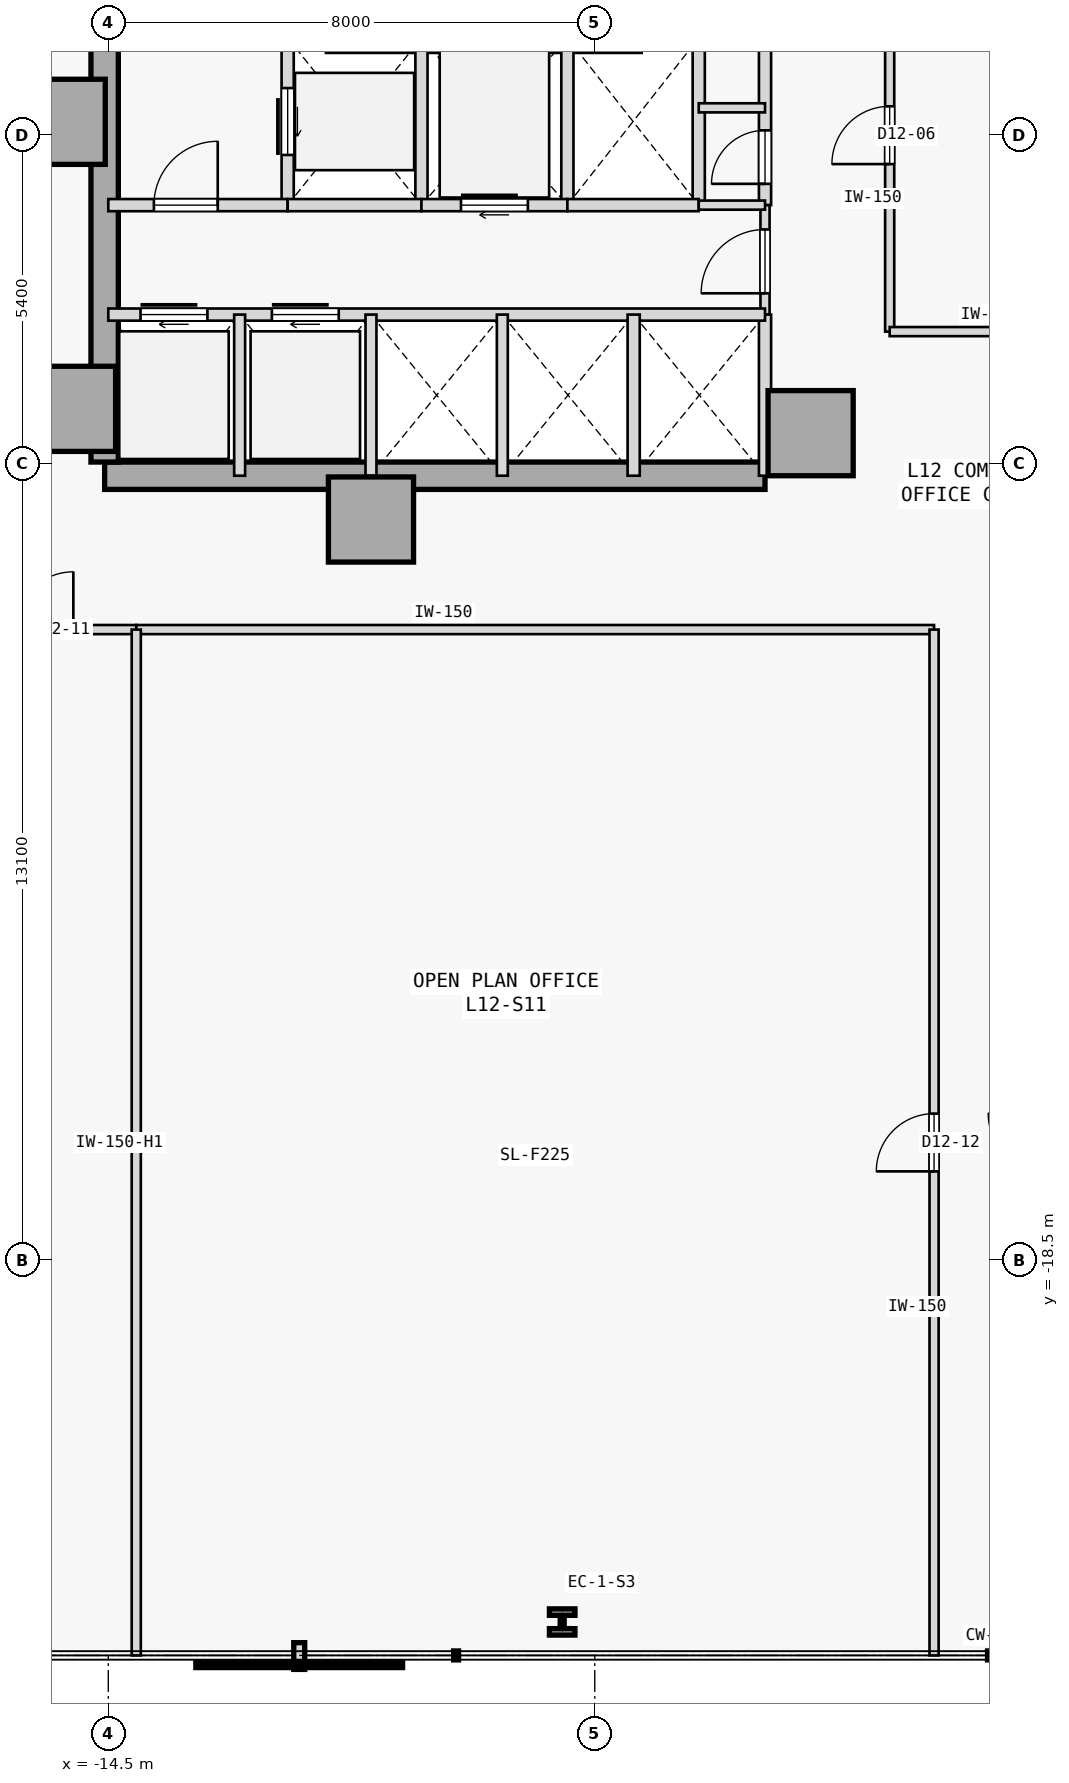
"""IFC4 building model, lengths in metres.
Left out: names, types, materials, properties, quantities, classifications, styles, units other than length and angle.
Written with IfcOpenShell. Run it as: python <this file> out.ifc"""

import sys

from ifc_helpers import new_model, si_unit, direction, frame, frame_2d, origin, origin_2d, place, context, subcontext, project, spatial, rectangle, i_section, extrude, element, fill, save


model = new_model("IFC4")
c1 = context("Model", 3, precision=1e-05, world=origin(), true_north=direction((0.0, 1.0)))
c2 = subcontext(c1, "Body", "Model", "MODEL_VIEW")
j1 = project(units=[si_unit("LENGTHUNIT", "METRE"), si_unit("PLANEANGLEUNIT", "RADIAN")], contexts=[c1])
p1 = place(None, origin())
s1 = spatial("IfcSite", under=j1, at=p1, CompositionType="ELEMENT")
p2 = place(p1, origin())
s2 = spatial("IfcBuilding", under=s1, at=p2, CompositionType="ELEMENT")
p3 = place(p2, frame((0.0, 0.0, 52.2)))
s3 = spatial("IfcBuildingStorey", under=s2, at=p3, CompositionType="ELEMENT", Elevation=52.2)
for number, where, z_axis, x_axis in (
    (1, (-15.25, 0.22, 0.0), (0.0, 0.0, 1.0), (1.0, 0.0, 0.0)),
    (2, (-15.08, -4.5, 0.0), (0.0, 0.0, 1.0), (1.0, 0.0, 0.0)),
    (3, (-10.18, -6.32, 0.0), (0.0, 0.0, 1.0), (1.0, 0.0, 0.0)),
    (4, (-2.95, -4.9, 0.0), (0.0, 0.0, 1.0), (1.0, 0.0, 0.0)),
):
    element("IfcColumn", number, at=place(p3, frame(where, z_axis=z_axis, x_axis=x_axis)), inside=s3, PredefinedType="COLUMN", context=c2, shape_type="SweptSolid", body=[
        extrude(rectangle(XDim=1.4, YDim=1.4, at=origin_2d()), origin(), (0.0, 0.0, 1.0), 3.8),
    ])
p4 = place(p3, frame((-14.56, -5.6, 0.0), z_axis=(0.0, 0.0, 1.0), x_axis=(1.0, 0.0, 0.0)))
e5 = element("IfcWall", 5, at=p4, inside=s3, PredefinedType="SHEAR", context=c2, shape_type="SweptSolid", body=[
    extrude(rectangle(XDim=10.86, YDim=0.45, at=frame_2d((5.43, 0.0))), origin(), (0.0, 0.0, 1.0), 3.575),
])
p5 = place(p3, frame((-14.56, -5.375, 0.0), z_axis=(0.0, 0.0, 1.0), x_axis=(0.0, 1.0, 0.0)))
e6 = element("IfcWall", 6, at=p5, inside=s3, PredefinedType="SHEAR", context=c2, shape_type="SweptSolid", body=[
    extrude(rectangle(XDim=10.75, YDim=0.45, at=frame_2d((5.375, 0.0))), origin(), (0.0, 0.0, 1.0), 3.575),
])
p6 = place(p3, frame((-7.036, -24.45, 0.0), z_axis=(0.0, 0.0, 1.0), x_axis=(1.0, 0.0, 0.0)))
e7 = element("IfcColumn", 7, at=p6, inside=s3, PredefinedType="COLUMN", context=c2, shape_type="SweptSolid", body=[
    extrude(i_section(OverallWidth=0.42, OverallDepth=0.431, WebThickness=0.065, FlangeThickness=0.106, FilletRadius=0.015, at=origin_2d()), origin(), (0.0, 0.0, 1.0), 3.8),
])
p7 = place(p3, frame((-3.7, -1.15, 0.0), z_axis=(0.0, 0.0, 1.0), x_axis=(0.0, 1.0, 0.0)))
e8 = element("IfcWall", 8, at=p7, inside=s3, PredefinedType="STANDARD", context=c2, shape_type="SweptSolid", body=[
    extrude(rectangle(XDim=6.75, YDim=0.2, at=frame_2d((3.375, 0.0))), origin(), (0.0, 0.0, 1.0), 3.575),
])
p8 = place(p7, frame((0.35, 0.0, 0.0)))
e9 = element("IfcOpeningElement", 9, at=p8, cuts=e8, PredefinedType="OPENING", context=c2, shape_type="SweptSolid", body=[
    extrude(rectangle(XDim=0.88, YDim=2.15, at=frame_2d((0.44, 1.075))), frame((0.0, 0.11, 0.0), z_axis=(0.0, -1.0, 0.0), x_axis=(1.0, 0.0, 0.0)), (0.0, 0.0, 1.0), 0.22),
])
p9 = place(p7, frame((2.55, 0.0, 0.0)))
e10 = element("IfcOpeningElement", 10, at=p9, cuts=e8, PredefinedType="OPENING", context=c2, shape_type="SweptSolid", body=[
    extrude(rectangle(XDim=0.92, YDim=2.15, at=frame_2d((0.46, 1.075))), frame((0.0, 0.11, 0.0), z_axis=(0.0, -1.0, 0.0), x_axis=(1.0, 0.0, 0.0)), (0.0, 0.0, 1.0), 0.22),
])
p10 = place(p7, frame((4.22, 0.0, 0.0)))
e11 = element("IfcOpeningElement", 11, at=p10, cuts=e8, PredefinedType="OPENING", context=c2, shape_type="SweptSolid", body=[
    extrude(rectangle(XDim=0.88, YDim=2.15, at=frame_2d((0.44, 1.075))), frame((0.0, 0.11, 0.0), z_axis=(0.0, -1.0, 0.0), x_axis=(1.0, 0.0, 0.0)), (0.0, 0.0, 1.0), 0.22),
])
p11 = place(p3, frame((-3.7, -2.95, 0.0), z_axis=(0.0, 0.0, 1.0), x_axis=(0.0, 1.0, 0.0)))
e12 = element("IfcWall", 12, at=p11, inside=s3, PredefinedType="PARTITIONING", context=c2, shape_type="SweptSolid", body=[
    extrude(rectangle(XDim=1.8, YDim=0.15, at=frame_2d((0.9, 0.0))), origin(), (0.0, 0.0, 1.0), 3.575),
])
p12 = place(p11, frame((0.35, 0.0, 0.0)))
e13 = element("IfcOpeningElement", 13, at=p12, cuts=e12, PredefinedType="OPENING", context=c2, shape_type="SweptSolid", body=[
    extrude(rectangle(XDim=1.05, YDim=2.18, at=frame_2d((0.525, 1.09))), frame((0.0, 0.085, 0.0), z_axis=(0.0, -1.0, 0.0), x_axis=(1.0, 0.0, 0.0)), (0.0, 0.0, 1.0), 0.17),
])
p13 = place(p3, frame((-3.7, -5.6, 0.0), z_axis=(0.0, 0.0, 1.0), x_axis=(0.0, 1.0, 0.0)))
e14 = element("IfcWall", 14, at=p13, inside=s3, PredefinedType="STANDARD", context=c2, shape_type="SweptSolid", body=[
    extrude(rectangle(XDim=2.65, YDim=0.2, at=frame_2d((1.325, 0.0))), origin(), (0.0, 0.0, 1.0), 3.575),
])
p14 = place(p3, frame((-11.55, -1.15, 0.0), z_axis=(0.0, 0.0, 1.0), x_axis=(0.0, 1.0, 0.0)))
e15 = element("IfcWall", 15, at=p14, inside=s3, PredefinedType="STANDARD", context=c2, shape_type="SweptSolid", body=[
    extrude(rectangle(XDim=2.75, YDim=0.2, at=frame_2d((1.375, 0.0))), origin(), (0.0, 0.0, 1.0), 3.575),
])
p15 = place(p14, frame((0.825, 0.0, 0.0)))
e16 = element("IfcOpeningElement", 16, at=p15, cuts=e15, PredefinedType="OPENING", context=c2, shape_type="SweptSolid", body=[
    extrude(rectangle(XDim=1.1, YDim=2.15, at=frame_2d((0.55, 1.075))), frame((0.0, 0.11, 0.0), z_axis=(0.0, -1.0, 0.0), x_axis=(1.0, 0.0, 0.0)), (0.0, 0.0, 1.0), 0.22),
])
p16 = place(p3, frame((-9.35, -1.15, 0.0), z_axis=(0.0, 0.0, 1.0), x_axis=(0.0, 1.0, 0.0)))
e17 = element("IfcWall", 17, at=p16, inside=s3, PredefinedType="STANDARD", context=c2, shape_type="SweptSolid", body=[
    extrude(rectangle(XDim=2.75, YDim=0.2, at=frame_2d((1.375, 0.0))), origin(), (0.0, 0.0, 1.0), 3.575),
])
p17 = place(p3, frame((-14.5, -1.15, 0.0), z_axis=(0.0, 0.0, 1.0), x_axis=(1.0, 0.0, 0.0)))
e18 = element("IfcWall", 18, at=p17, inside=s3, PredefinedType="STANDARD", context=c2, shape_type="SweptSolid", body=[
    extrude(rectangle(XDim=2.95, YDim=0.2, at=frame_2d((1.475, 0.0))), origin(), (0.0, 0.0, 1.0), 3.575),
])
p18 = place(p17, frame((0.75, 0.0, 0.0)))
e19 = element("IfcOpeningElement", 19, at=p18, cuts=e18, PredefinedType="OPENING", context=c2, shape_type="SweptSolid", body=[
    extrude(rectangle(XDim=1.05, YDim=2.18, at=frame_2d((0.525, 1.09))), frame((0.0, 0.11, 0.0), z_axis=(0.0, -1.0, 0.0), x_axis=(1.0, 0.0, 0.0)), (0.0, 0.0, 1.0), 0.22),
])
p19 = place(p3, frame((-11.55, -1.15, 0.0), z_axis=(0.0, 0.0, 1.0), x_axis=(1.0, 0.0, 0.0)))
e20 = element("IfcWall", 20, at=p19, inside=s3, PredefinedType="STANDARD", context=c2, shape_type="SweptSolid", body=[
    extrude(rectangle(XDim=2.2, YDim=0.2, at=frame_2d((1.1, 0.0))), origin(), (0.0, 0.0, 1.0), 3.575),
])
p20 = place(p3, frame((-6.95, -1.15, 0.0), z_axis=(0.0, 0.0, 1.0), x_axis=(0.0, 1.0, 0.0)))
e21 = element("IfcWall", 21, at=p20, inside=s3, PredefinedType="STANDARD", context=c2, shape_type="SweptSolid", body=[
    extrude(rectangle(XDim=2.75, YDim=0.2, at=frame_2d((1.375, 0.0))), origin(), (0.0, 0.0, 1.0), 3.575),
])
p21 = place(p3, frame((-9.35, -1.15, 0.0), z_axis=(0.0, 0.0, 1.0), x_axis=(1.0, 0.0, 0.0)))
e22 = element("IfcWall", 22, at=p21, inside=s3, PredefinedType="STANDARD", context=c2, shape_type="SweptSolid", body=[
    extrude(rectangle(XDim=2.4, YDim=0.2, at=frame_2d((1.2, 0.0))), origin(), (0.0, 0.0, 1.0), 3.575),
])
p22 = place(p21, frame((0.65, 0.0, 0.0)))
e23 = element("IfcOpeningElement", 23, at=p22, cuts=e22, PredefinedType="OPENING", context=c2, shape_type="SweptSolid", body=[
    extrude(rectangle(XDim=1.1, YDim=2.15, at=frame_2d((0.55, 1.075))), frame((0.0, 0.11, 0.0), z_axis=(0.0, -1.0, 0.0), x_axis=(1.0, 0.0, 0.0)), (0.0, 0.0, 1.0), 0.22),
])
p23 = place(p3, frame((-4.79, -1.15, 0.0), z_axis=(0.0, 0.0, 1.0), x_axis=(0.0, 1.0, 0.0)))
e24 = element("IfcWall", 24, at=p23, inside=s3, PredefinedType="STANDARD", context=c2, shape_type="SweptSolid", body=[
    extrude(rectangle(XDim=2.75, YDim=0.2, at=frame_2d((1.375, 0.0))), origin(), (0.0, 0.0, 1.0), 3.575),
])
p24 = place(p3, frame((-6.95, -1.15, 0.0), z_axis=(0.0, 0.0, 1.0), x_axis=(1.0, 0.0, 0.0)))
e25 = element("IfcWall", 25, at=p24, inside=s3, PredefinedType="STANDARD", context=c2, shape_type="SweptSolid", body=[
    extrude(rectangle(XDim=2.16, YDim=0.2, at=frame_2d((1.08, 0.0))), origin(), (0.0, 0.0, 1.0), 3.575),
])
p25 = place(p3, frame((-4.79, -1.15, 0.0), z_axis=(0.0, 0.0, 1.0), x_axis=(1.0, 0.0, 0.0)))
e26 = element("IfcWall", 26, at=p25, inside=s3, PredefinedType="PARTITIONING", context=c2, shape_type="SweptSolid", body=[
    extrude(rectangle(XDim=1.09, YDim=0.15, at=frame_2d((0.545, 0.0))), origin(), (0.0, 0.0, 1.0), 3.575),
])
p26 = place(p3, frame((-14.5, -2.95, 0.0), z_axis=(0.0, 0.0, 1.0), x_axis=(1.0, 0.0, 0.0)))
e27 = element("IfcWall", 27, at=p26, inside=s3, PredefinedType="STANDARD", context=c2, shape_type="SweptSolid", body=[
    extrude(rectangle(XDim=10.8, YDim=0.2, at=frame_2d((5.4, 0.0))), origin(), (0.0, 0.0, 1.0), 3.575),
])
p27 = place(p26, frame((0.53, 0.0, 0.0)))
e28 = element("IfcOpeningElement", 28, at=p27, cuts=e27, PredefinedType="OPENING", context=c2, shape_type="SweptSolid", body=[
    extrude(rectangle(XDim=1.1, YDim=2.15, at=frame_2d((0.55, 1.075))), frame((0.0, 0.11, 0.0), z_axis=(0.0, -1.0, 0.0), x_axis=(1.0, 0.0, 0.0)), (0.0, 0.0, 1.0), 0.22),
])
p28 = place(p26, frame((2.69, 0.0, 0.0)))
e29 = element("IfcOpeningElement", 29, at=p28, cuts=e27, PredefinedType="OPENING", context=c2, shape_type="SweptSolid", body=[
    extrude(rectangle(XDim=1.1, YDim=2.15, at=frame_2d((0.55, 1.075))), frame((0.0, 0.11, 0.0), z_axis=(0.0, -1.0, 0.0), x_axis=(1.0, 0.0, 0.0)), (0.0, 0.0, 1.0), 0.22),
])
p29 = place(p3, frame((-5.86, -5.6, 0.0), z_axis=(0.0, 0.0, 1.0), x_axis=(0.0, 1.0, 0.0)))
e30 = element("IfcWall", 30, at=p29, inside=s3, PredefinedType="STANDARD", context=c2, shape_type="SweptSolid", body=[
    extrude(rectangle(XDim=2.65, YDim=0.2, at=frame_2d((1.325, 0.0))), origin(), (0.0, 0.0, 1.0), 3.575),
])
for number, where, z_axis, x_axis in (
    (31, (-12.34, -5.6, 0.0), (0.0, 0.0, 1.0), (0.0, 1.0, 0.0)),
    (32, (-10.18, -5.6, 0.0), (0.0, 0.0, 1.0), (0.0, 1.0, 0.0)),
    (33, (-8.02, -5.6, 0.0), (0.0, 0.0, 1.0), (0.0, 1.0, 0.0)),
):
    element("IfcWall", number, at=place(p3, frame(where, z_axis=z_axis, x_axis=x_axis)), inside=s3, PredefinedType="STANDARD", context=c2, shape_type="SweptSolid", body=[
        extrude(rectangle(XDim=2.65, YDim=0.18, at=frame_2d((1.325, 0.0))), origin(), (0.0, 0.0, 1.0), 3.575),
    ])
p30 = place(p3, frame((-4.79, 0.45, 0.0), z_axis=(0.0, 0.0, 1.0), x_axis=(1.0, 0.0, 0.0)))
e34 = element("IfcWall", 34, at=p30, inside=s3, PredefinedType="PARTITIONING", context=c2, shape_type="SweptSolid", body=[
    extrude(rectangle(XDim=1.09, YDim=0.15, at=frame_2d((0.545, 0.0))), origin(), (0.0, 0.0, 1.0), 3.575),
])
p31 = place(p3, frame((-1.65, -3.23, 0.0), z_axis=(0.0, 0.0, 1.0), x_axis=(0.0, 1.0, 0.0)))
e35 = element("IfcWall", 35, at=p31, inside=s3, PredefinedType="PARTITIONING", context=c2, shape_type="SweptSolid", body=[
    extrude(rectangle(XDim=6.46, YDim=0.15, at=frame_2d((3.23, 0.0))), origin(), (0.0, 0.0, 1.0), 3.575),
])
p32 = place(p31, frame((2.755, 0.0, 0.0)))
e36 = element("IfcOpeningElement", 36, at=p32, cuts=e35, PredefinedType="OPENING", context=c2, shape_type="SweptSolid", body=[
    extrude(rectangle(XDim=0.95, YDim=2.15, at=frame_2d((0.475, 1.075))), frame((0.0, 0.085, 0.0), z_axis=(0.0, -1.0, 0.0), x_axis=(1.0, 0.0, 0.0)), (0.0, 0.0, 1.0), 0.17),
])
p33 = place(p3, frame((-1.65, -3.23, 0.0), z_axis=(0.0, 0.0, 1.0), x_axis=(1.0, 0.0, 0.0)))
e37 = element("IfcWall", 37, at=p33, inside=s3, PredefinedType="PARTITIONING", context=c2, shape_type="SweptSolid", body=[
    extrude(rectangle(XDim=3.3, YDim=0.15, at=frame_2d((1.65, 0.0))), origin(), (0.0, 0.0, 1.0), 3.575),
])
p34 = place(p3, frame((-17.059, -8.13, 0.0), z_axis=(0.0, 0.0, 1.0), x_axis=(1.0, 0.0, 0.0)))
e38 = element("IfcWall", 38, at=p34, inside=s3, PredefinedType="PARTITIONING", context=c2, shape_type="SweptSolid", body=[
    extrude(rectangle(XDim=3.019, YDim=0.15, at=frame_2d((1.51, 0.0))), origin(), (0.0, 0.0, 1.0), 3.575),
])
p35 = place(p34, frame((1.034, 0.0, 0.0)))
e39 = element("IfcOpeningElement", 39, at=p35, cuts=e38, PredefinedType="OPENING", context=c2, shape_type="SweptSolid", body=[
    extrude(rectangle(XDim=0.95, YDim=2.15, at=frame_2d((0.475, 1.075))), frame((0.0, 0.085, 0.0), z_axis=(0.0, -1.0, 0.0), x_axis=(1.0, 0.0, 0.0)), (0.0, 0.0, 1.0), 0.17),
])
p36 = place(p3, frame((-14.04, -8.13, 0.0), z_axis=(0.0, 0.0, 1.0), x_axis=(1.0, 0.0, 0.0)))
e40 = element("IfcWall", 40, at=p36, inside=s3, PredefinedType="PARTITIONING", context=c2, shape_type="SweptSolid", body=[
    extrude(rectangle(XDim=13.12, YDim=0.15, at=frame_2d((6.56, 0.0))), origin(), (0.0, 0.0, 1.0), 3.575),
])
p37 = place(p3, frame((-0.92, -25.0, 0.0), z_axis=(0.0, 0.0, 1.0), x_axis=(0.0, 1.0, 0.0)))
e41 = element("IfcWall", 41, at=p37, inside=s3, PredefinedType="PARTITIONING", context=c2, shape_type="SweptSolid", body=[
    extrude(rectangle(XDim=16.87, YDim=0.15, at=frame_2d((8.435, 0.0))), origin(), (0.0, 0.0, 1.0), 3.575),
])
p38 = place(p37, frame((7.96, 0.0, 0.0)))
e42 = element("IfcOpeningElement", 42, at=p38, cuts=e41, PredefinedType="OPENING", context=c2, shape_type="SweptSolid", body=[
    extrude(rectangle(XDim=0.95, YDim=2.15, at=frame_2d((0.475, 1.075))), frame((0.0, 0.085, 0.0), z_axis=(0.0, -1.0, 0.0), x_axis=(1.0, 0.0, 0.0)), (0.0, 0.0, 1.0), 0.17),
])
p39 = place(p3, frame((-14.04, -25.0, 0.0), z_axis=(0.0, 0.0, 1.0), x_axis=(0.0, 1.0, 0.0)))
e43 = element("IfcWall", 43, at=p39, inside=s3, PredefinedType="PARTITIONING", context=c2, shape_type="SweptSolid", body=[
    extrude(rectangle(XDim=16.87, YDim=0.15, at=frame_2d((8.435, 0.0))), origin(), (0.0, 0.0, 1.0), 3.125),
])
p40 = place(p18, origin())
e44 = element("IfcDoor", 44, at=p40, inside=s3, OperationType="SINGLE_SWING_RIGHT", PredefinedType="DOOR", context=c2, shape_type="SweptSolid", body=[
    extrude(rectangle(XDim=1.05, YDim=2.18, at=frame_2d((0.525, 1.09))), frame((0.0, 0.025, 0.0), z_axis=(0.0, -1.0, 0.0), x_axis=(1.0, 0.0, 0.0)), (0.0, 0.0, 1.0), 0.05),
])
fill(e19, e44)
p41 = place(p12, origin())
e45 = element("IfcDoor", 45, at=p41, inside=s3, OperationType="SINGLE_SWING_LEFT", PredefinedType="DOOR", context=c2, shape_type="SweptSolid", body=[
    extrude(rectangle(XDim=1.05, YDim=2.18, at=frame_2d((0.525, 1.09))), frame((0.0, 0.025, 0.0), z_axis=(0.0, -1.0, 0.0), x_axis=(1.0, 0.0, 0.0)), (0.0, 0.0, 1.0), 0.05),
])
fill(e13, e45)
p42 = place(p15, origin())
e46 = element("IfcDoor", 46, at=p42, inside=s3, OperationType="SLIDING_TO_RIGHT", PredefinedType="DOOR", context=c2, shape_type="SweptSolid", body=[
    extrude(rectangle(XDim=1.1, YDim=2.15, at=frame_2d((0.55, 1.075))), frame((0.0, 0.025, 0.0), z_axis=(0.0, -1.0, 0.0), x_axis=(1.0, 0.0, 0.0)), (0.0, 0.0, 1.0), 0.05),
])
fill(e16, e46)
p43 = place(p22, origin())
e47 = element("IfcDoor", 47, at=p43, inside=s3, OperationType="SLIDING_TO_RIGHT", PredefinedType="DOOR", context=c2, shape_type="SweptSolid", body=[
    extrude(rectangle(XDim=1.1, YDim=2.15, at=frame_2d((0.55, 1.075))), frame((0.0, 0.025, 0.0), z_axis=(0.0, -1.0, 0.0), x_axis=(1.0, 0.0, 0.0)), (0.0, 0.0, 1.0), 0.05),
])
fill(e23, e47)
p44 = place(p27, origin())
e48 = element("IfcDoor", 48, at=p44, inside=s3, OperationType="SLIDING_TO_RIGHT", PredefinedType="DOOR", context=c2, shape_type="SweptSolid", body=[
    extrude(rectangle(XDim=1.1, YDim=2.15, at=frame_2d((0.55, 1.075))), frame((0.0, 0.025, 0.0), z_axis=(0.0, -1.0, 0.0), x_axis=(1.0, 0.0, 0.0)), (0.0, 0.0, 1.0), 0.05),
])
fill(e28, e48)
p45 = place(p28, origin())
e49 = element("IfcDoor", 49, at=p45, inside=s3, OperationType="SLIDING_TO_RIGHT", PredefinedType="DOOR", context=c2, shape_type="SweptSolid", body=[
    extrude(rectangle(XDim=1.1, YDim=2.15, at=frame_2d((0.55, 1.075))), frame((0.0, 0.025, 0.0), z_axis=(0.0, -1.0, 0.0), x_axis=(1.0, 0.0, 0.0)), (0.0, 0.0, 1.0), 0.05),
])
fill(e29, e49)
p46 = place(p8, origin())
e50 = element("IfcDoor", 50, at=p46, inside=s3, OperationType="SINGLE_SWING_LEFT", PredefinedType="DOOR", context=c2, shape_type="SweptSolid", body=[
    extrude(rectangle(XDim=0.88, YDim=2.15, at=frame_2d((0.44, 1.075))), frame((0.0, 0.025, 0.0), z_axis=(0.0, -1.0, 0.0), x_axis=(1.0, 0.0, 0.0)), (0.0, 0.0, 1.0), 0.05),
])
fill(e9, e50)
p47 = place(p32, origin())
e51 = element("IfcDoor", 51, at=p47, inside=s3, OperationType="SINGLE_SWING_LEFT", PredefinedType="DOOR", context=c2, shape_type="SweptSolid", body=[
    extrude(rectangle(XDim=0.95, YDim=2.15, at=frame_2d((0.475, 1.075))), frame((0.0, 0.025, 0.0), z_axis=(0.0, -1.0, 0.0), x_axis=(1.0, 0.0, 0.0)), (0.0, 0.0, 1.0), 0.05),
])
fill(e36, e51)
p48 = place(p35, origin())
e52 = element("IfcDoor", 52, at=p48, inside=s3, OperationType="SINGLE_SWING_RIGHT", PredefinedType="DOOR", context=c2, shape_type="SweptSolid", body=[
    extrude(rectangle(XDim=0.95, YDim=2.15, at=frame_2d((0.475, 1.075))), frame((0.0, 0.025, 0.0), z_axis=(0.0, -1.0, 0.0), x_axis=(1.0, 0.0, 0.0)), (0.0, 0.0, 1.0), 0.05),
])
fill(e39, e52)
p49 = place(p38, origin())
e53 = element("IfcDoor", 53, at=p49, inside=s3, OperationType="SINGLE_SWING_LEFT", PredefinedType="DOOR", context=c2, shape_type="SweptSolid", body=[
    extrude(rectangle(XDim=0.95, YDim=2.15, at=frame_2d((0.475, 1.075))), frame((0.0, 0.025, 0.0), z_axis=(0.0, -1.0, 0.0), x_axis=(1.0, 0.0, 0.0)), (0.0, 0.0, 1.0), 0.05),
])
fill(e42, e53)
save(model, sys.argv[1])
